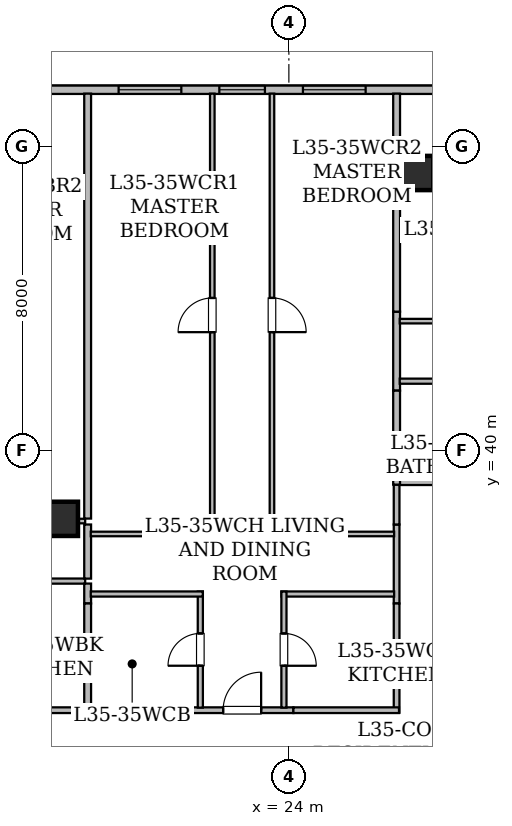
"""IFC4 building model, lengths in metres.
Left out: names, types, materials, properties, quantities, classifications, styles, units other than length and angle.
Written with IfcOpenShell. Run it as: python <this file> out.ifc"""

import sys

from ifc_helpers import new_model, si_unit, direction, frame, frame_2d, origin, origin_2d, place, context, subcontext, project, spatial, rectangle, hollow_rectangle, extrude, element, fill, save


model = new_model("IFC4")
c1 = context("Model", 3, precision=1e-05, world=origin(), true_north=direction((0.0, 1.0)))
c2 = subcontext(c1, "Body", "Model", "MODEL_VIEW")
j1 = project(units=[si_unit("LENGTHUNIT", "METRE"), si_unit("PLANEANGLEUNIT", "RADIAN")], contexts=[c1])
p1 = place(None, origin())
s1 = spatial("IfcSite", under=j1, at=p1, CompositionType="ELEMENT")
p2 = place(p1, origin())
s2 = spatial("IfcBuilding", under=s1, at=p2, CompositionType="ELEMENT")
p3 = place(p2, frame((0.0, 0.0, 138.4)))
s3 = spatial("IfcBuildingStorey", under=s2, at=p3, CompositionType="ELEMENT", Elevation=138.4)
for number, where, z_axis, x_axis in (
    (1, (27.35, 47.3, 0.0), (0.0, 0.0, 1.0), (1.0, 0.0, 0.0)),
    (2, (18.0, 38.2, 0.0), (0.0, 0.0, 1.0), (1.0, 0.0, 0.0)),
):
    element("IfcColumn", number, at=place(p3, frame(where, z_axis=z_axis, x_axis=x_axis)), inside=s3, PredefinedType="COLUMN", context=c2, shape_type="SweptSolid", body=[
        extrude(hollow_rectangle(XDim=0.9, YDim=0.9, WallThickness=0.045, at=origin_2d()), origin(), (0.0, 0.0, 1.0), 3.65),
    ])
p4 = place(p3, frame((13.715, 49.49, 0.0), z_axis=(0.0, 0.0, 1.0), x_axis=(1.0, 0.0, 0.0)))
e3 = element("IfcWall", 3, at=p4, inside=s3, PredefinedType="STANDARD", context=c2, shape_type="SweptSolid", body=[
    extrude(rectangle(XDim=38.639, YDim=0.22, at=frame_2d((19.319, 0.0))), origin(), (0.0, 0.0, 1.0), 3.43),
])
p5 = place(p4, frame((2.243, 0.0, 0.85)))
e4 = element("IfcOpeningElement", 4, at=p5, cuts=e3, PredefinedType="OPENING", context=c2, shape_type="SweptSolid", body=[
    extrude(rectangle(XDim=1.65, YDim=1.55, at=frame_2d((0.825, 0.775))), frame((0.0, 0.12, 0.0), z_axis=(0.0, -1.0, 0.0), x_axis=(1.0, 0.0, 0.0)), (0.0, 0.0, 1.0), 0.24),
])
p6 = place(p4, frame((8.455, 0.0, 0.8)))
e5 = element("IfcOpeningElement", 5, at=p6, cuts=e3, PredefinedType="OPENING", context=c2, shape_type="SweptSolid", body=[
    extrude(rectangle(XDim=1.2, YDim=1.5, at=frame_2d((0.6, 0.75))), frame((0.0, 0.12, 0.0), z_axis=(0.0, -1.0, 0.0), x_axis=(1.0, 0.0, 0.0)), (0.0, 0.0, 1.0), 0.24),
])
p7 = place(p4, frame((5.805, 0.0, 0.85)))
e6 = element("IfcOpeningElement", 6, at=p7, cuts=e3, PredefinedType="OPENING", context=c2, shape_type="SweptSolid", body=[
    extrude(rectangle(XDim=1.65, YDim=1.55, at=frame_2d((0.825, 0.775))), frame((0.0, 0.12, 0.0), z_axis=(0.0, -1.0, 0.0), x_axis=(1.0, 0.0, 0.0)), (0.0, 0.0, 1.0), 0.24),
])
p8 = place(p4, frame((10.655, 0.0, 0.85)))
e7 = element("IfcOpeningElement", 7, at=p8, cuts=e3, PredefinedType="OPENING", context=c2, shape_type="SweptSolid", body=[
    extrude(rectangle(XDim=1.65, YDim=1.55, at=frame_2d((0.825, 0.775))), frame((0.0, 0.12, 0.0), z_axis=(0.0, -1.0, 0.0), x_axis=(1.0, 0.0, 0.0)), (0.0, 0.0, 1.0), 0.24),
])
p9 = place(p4, frame((16.851, 0.0, 0.85)))
e8 = element("IfcOpeningElement", 8, at=p9, cuts=e3, PredefinedType="OPENING", context=c2, shape_type="SweptSolid", body=[
    extrude(rectangle(XDim=1.65, YDim=1.55, at=frame_2d((0.825, 0.775))), frame((0.0, 0.12, 0.0), z_axis=(0.0, -1.0, 0.0), x_axis=(1.0, 0.0, 0.0)), (0.0, 0.0, 1.0), 0.24),
])
p10 = place(p4, frame((24.116, 0.0, 0.85)))
e9 = element("IfcOpeningElement", 9, at=p10, cuts=e3, PredefinedType="OPENING", context=c2, shape_type="SweptSolid", body=[
    extrude(rectangle(XDim=1.65, YDim=1.55, at=frame_2d((0.825, 0.775))), frame((0.0, 0.12, 0.0), z_axis=(0.0, -1.0, 0.0), x_axis=(1.0, 0.0, 0.0)), (0.0, 0.0, 1.0), 0.24),
])
p11 = place(p4, frame((30.23, 0.0, 0.85)))
e10 = element("IfcOpeningElement", 10, at=p11, cuts=e3, PredefinedType="OPENING", context=c2, shape_type="SweptSolid", body=[
    extrude(rectangle(XDim=1.65, YDim=1.55, at=frame_2d((0.825, 0.775))), frame((0.0, 0.12, 0.0), z_axis=(0.0, -1.0, 0.0), x_axis=(1.0, 0.0, 0.0)), (0.0, 0.0, 1.0), 0.24),
])
p12 = place(p4, frame((36.367, 0.0, 0.85)))
e11 = element("IfcOpeningElement", 11, at=p12, cuts=e3, PredefinedType="OPENING", context=c2, shape_type="SweptSolid", body=[
    extrude(rectangle(XDim=1.65, YDim=1.55, at=frame_2d((0.825, 0.775))), frame((0.0, 0.12, 0.0), z_axis=(0.0, -1.0, 0.0), x_axis=(1.0, 0.0, 0.0)), (0.0, 0.0, 1.0), 0.24),
])
p13 = place(p3, frame((15.424, 33.165, 0.0), z_axis=(0.0, 0.0, 1.0), x_axis=(1.0, 0.0, 0.0)))
e12 = element("IfcWall", 12, at=p13, inside=s3, PredefinedType="STANDARD", context=c2, shape_type="SweptSolid", body=[
    extrude(rectangle(XDim=3.53, YDim=0.15, at=frame_2d((1.765, 0.0))), origin(), (0.0, 0.0, 1.0), 2.647),
])
p14 = place(p3, frame((26.835, 35.973, 0.0), z_axis=(0.0, 0.0, 1.0), x_axis=(0.0, 1.0, 0.0)))
e13 = element("IfcWall", 13, at=p14, inside=s3, PredefinedType="STANDARD", context=c2, shape_type="SweptSolid", body=[
    extrude(rectangle(XDim=2.078, YDim=0.15, at=frame_2d((1.039, 0.0))), origin(), (0.0, 0.0, 1.0), 2.647),
])
p15 = place(p3, frame((21.421, 33.165, 0.0), z_axis=(0.0, 0.0, 1.0), x_axis=(1.0, 0.0, 0.0)))
e14 = element("IfcWall", 14, at=p15, inside=s3, PredefinedType="STANDARD", context=c2, shape_type="SweptSolid", body=[
    extrude(rectangle(XDim=2.698, YDim=0.15, at=frame_2d((1.349, 0.0))), origin(), (0.0, 0.0, 1.0), 3.43),
])
p16 = place(p15, frame((0.849, 0.0, 0.0)))
e15 = element("IfcOpeningElement", 15, at=p16, cuts=e14, PredefinedType="OPENING", context=c2, shape_type="SweptSolid", body=[
    extrude(rectangle(XDim=1.0, YDim=2.15, at=frame_2d((0.5, 1.075))), frame((0.0, 0.085, 0.0), z_axis=(0.0, -1.0, 0.0), x_axis=(1.0, 0.0, 0.0)), (0.0, 0.0, 1.0), 0.17),
])
p17 = place(p3, frame((18.954, 33.165, 0.0), z_axis=(0.0, 0.0, 1.0), x_axis=(1.0, 0.0, 0.0)))
e16 = element("IfcWall", 16, at=p17, inside=s3, PredefinedType="STANDARD", context=c2, shape_type="SweptSolid", body=[
    extrude(rectangle(XDim=2.467, YDim=0.15, at=frame_2d((1.233, 0.0))), origin(), (0.0, 0.0, 1.0), 3.43),
])
p18 = place(p3, frame((26.835, 33.1, 0.0), z_axis=(0.0, 0.0, 1.0), x_axis=(0.0, 1.0, 0.0)))
e17 = element("IfcWall", 17, at=p18, inside=s3, PredefinedType="STANDARD", context=c2, shape_type="SweptSolid", body=[
    extrude(rectangle(XDim=2.873, YDim=0.15, at=frame_2d((1.437, 0.0))), origin(), (0.0, 0.0, 1.0), 3.43),
])
p19 = place(p3, frame((24.119, 33.165, 0.0), z_axis=(0.0, 0.0, 1.0), x_axis=(1.0, 0.0, 0.0)))
e18 = element("IfcWall", 18, at=p19, inside=s3, PredefinedType="STANDARD", context=c2, shape_type="SweptSolid", body=[
    extrude(rectangle(XDim=2.779, YDim=0.15, at=frame_2d((1.39, 0.0))), origin(), (0.0, 0.0, 1.0), 3.43),
])
p20 = place(p3, frame((26.835, 38.051, 0.0), z_axis=(0.0, 0.0, 1.0), x_axis=(0.0, 1.0, 0.0)))
e19 = element("IfcWall", 19, at=p20, inside=s3, PredefinedType="STANDARD", context=c2, shape_type="SweptSolid", body=[
    extrude(rectangle(XDim=1.049, YDim=0.15, at=frame_2d((0.524, 0.0))), origin(), (0.0, 0.0, 1.0), 3.43),
])
p21 = place(p3, frame((26.9, 39.165, 0.0), z_axis=(0.0, 0.0, 1.0), x_axis=(1.0, 0.0, 0.0)))
e20 = element("IfcWall", 20, at=p21, inside=s3, PredefinedType="STANDARD", context=c2, shape_type="SweptSolid", body=[
    extrude(rectangle(XDim=4.701, YDim=0.15, at=frame_2d((2.351, 0.0))), origin(), (0.0, 0.0, 1.0), 2.647),
])
p22 = place(p3, frame((18.64, 36.562, 0.0), z_axis=(0.0, 0.0, 1.0), x_axis=(-1.0, 0.0, 0.0)))
e21 = element("IfcWall", 21, at=p22, inside=s3, PredefinedType="PARTITIONING", context=c2, shape_type="SweptSolid", body=[
    extrude(rectangle(XDim=3.53, YDim=0.135, at=frame_2d((1.765, 0.0))), origin(), (0.0, 0.0, 1.0), 2.647),
])
p23 = place(p22, frame((1.34, 0.0, 0.0)))
e22 = element("IfcOpeningElement", 22, at=p23, cuts=e21, PredefinedType="OPENING", context=c2, shape_type="SweptSolid", body=[
    extrude(rectangle(XDim=0.85, YDim=2.1, at=frame_2d((0.425, 1.05))), frame((0.0, 0.077, 0.0), z_axis=(0.0, -1.0, 0.0), x_axis=(1.0, 0.0, 0.0)), (0.0, 0.0, 1.0), 0.155),
])
p24 = place(p3, frame((14.795, 38.142, 0.0), z_axis=(0.0, 0.0, 1.0), x_axis=(1.0, 0.0, 0.0)))
e23 = element("IfcWall", 23, at=p24, inside=s3, PredefinedType="PARTITIONING", context=c2, shape_type="SweptSolid", body=[
    extrude(rectangle(XDim=3.845, YDim=0.12, at=frame_2d((1.922, 0.0))), origin(), (0.0, 0.0, 1.0), 2.647),
])
p25 = place(p3, frame((18.705, 38.051, 0.0), z_axis=(0.0, 0.0, 1.0), x_axis=(0.0, -1.0, 0.0)))
e24 = element("IfcWall", 24, at=p25, inside=s3, PredefinedType="STANDARD", context=c2, shape_type="SweptSolid", body=[
    extrude(rectangle(XDim=1.424, YDim=0.18, at=frame_2d((0.712, 0.0))), origin(), (0.0, 0.0, 1.0), 2.647),
])
p26 = place(p3, frame((18.705, 36.497, 0.0), z_axis=(0.0, 0.0, 1.0), x_axis=(0.0, -1.0, 0.0)))
e25 = element("IfcWall", 25, at=p26, inside=s3, PredefinedType="STANDARD", context=c2, shape_type="SweptSolid", body=[
    extrude(rectangle(XDim=0.524, YDim=0.18, at=frame_2d((0.262, 0.0))), origin(), (0.0, 0.0, 1.0), 3.43),
])
p27 = place(p3, frame((18.705, 35.973, 0.0), z_axis=(0.0, 0.0, 1.0), x_axis=(0.0, -1.0, 0.0)))
e26 = element("IfcWall", 26, at=p27, inside=s3, PredefinedType="STANDARD", context=c2, shape_type="SweptSolid", body=[
    extrude(rectangle(XDim=2.741, YDim=0.18, at=frame_2d((1.371, 0.0))), origin(), (0.0, 0.0, 1.0), 3.43),
])
p28 = place(p3, frame((18.705, 49.388, 0.0), z_axis=(0.0, 0.0, 1.0), x_axis=(0.0, -1.0, 0.0)))
e27 = element("IfcWall", 27, at=p28, inside=s3, PredefinedType="STANDARD", context=c2, shape_type="SweptSolid", body=[
    extrude(rectangle(XDim=11.181, YDim=0.18, at=frame_2d((5.59, 0.0))), origin(), (0.0, 0.0, 1.0), 2.647),
])
p29 = place(p3, frame((21.67, 33.232, 0.0), z_axis=(0.0, 0.0, 1.0), x_axis=(0.0, 1.0, 0.0)))
e28 = element("IfcWall", 28, at=p29, inside=s3, PredefinedType="PARTITIONING", context=c2, shape_type="SweptSolid", body=[
    extrude(rectangle(XDim=3.055, YDim=0.135, at=frame_2d((1.528, 0.0))), origin(), (0.0, 0.0, 1.0), 3.43),
])
p30 = place(p29, frame((1.103, 0.0, 0.0)))
e29 = element("IfcOpeningElement", 29, at=p30, cuts=e28, PredefinedType="OPENING", context=c2, shape_type="SweptSolid", body=[
    extrude(rectangle(XDim=0.85, YDim=2.1, at=frame_2d((0.425, 1.05))), frame((0.0, 0.077, 0.0), z_axis=(0.0, -1.0, 0.0), x_axis=(1.0, 0.0, 0.0)), (0.0, 0.0, 1.0), 0.155),
])
p31 = place(p3, frame((21.735, 36.222, 0.0), z_axis=(0.0, 0.0, 1.0), x_axis=(-1.0, 0.0, 0.0)))
e30 = element("IfcWall", 30, at=p31, inside=s3, PredefinedType="PARTITIONING", context=c2, shape_type="SweptSolid", body=[
    extrude(rectangle(XDim=2.948, YDim=0.135, at=frame_2d((1.474, 0.0))), origin(), (0.0, 0.0, 1.0), 3.43),
])
p32 = place(p3, frame((26.77, 36.222, 0.0), z_axis=(0.0, 0.0, 1.0), x_axis=(-1.0, 0.0, 0.0)))
e31 = element("IfcWall", 31, at=p32, inside=s3, PredefinedType="PARTITIONING", context=c2, shape_type="SweptSolid", body=[
    extrude(rectangle(XDim=2.965, YDim=0.135, at=frame_2d((1.482, 0.0))), origin(), (0.0, 0.0, 1.0), 3.43),
])
p33 = place(p3, frame((23.87, 36.287, 0.0), z_axis=(0.0, 0.0, 1.0), x_axis=(0.0, -1.0, 0.0)))
e32 = element("IfcWall", 32, at=p33, inside=s3, PredefinedType="PARTITIONING", context=c2, shape_type="SweptSolid", body=[
    extrude(rectangle(XDim=3.055, YDim=0.135, at=frame_2d((1.528, 0.0))), origin(), (0.0, 0.0, 1.0), 3.43),
])
p34 = place(p33, frame((1.103, 0.0, 0.0)))
e33 = element("IfcOpeningElement", 33, at=p34, cuts=e32, PredefinedType="OPENING", context=c2, shape_type="SweptSolid", body=[
    extrude(rectangle(XDim=0.85, YDim=2.1, at=frame_2d((0.425, 1.05))), frame((0.0, 0.077, 0.0), z_axis=(0.0, -1.0, 0.0), x_axis=(1.0, 0.0, 0.0)), (0.0, 0.0, 1.0), 0.155),
])
p35 = place(p3, frame((18.787, 37.802, 0.0), z_axis=(0.0, 0.0, 1.0), x_axis=(1.0, 0.0, 0.0)))
e34 = element("IfcWall", 34, at=p35, inside=s3, PredefinedType="PARTITIONING", context=c2, shape_type="SweptSolid", body=[
    extrude(rectangle(XDim=3.263, YDim=0.12, at=frame_2d((1.631, 0.0))), origin(), (0.0, 0.0, 1.0), 2.647),
])
p36 = place(p3, frame((21.985, 37.737, 0.0), z_axis=(0.0, 0.0, 1.0), x_axis=(0.0, 1.0, 0.0)))
e35 = element("IfcWall", 35, at=p36, inside=s3, PredefinedType="PARTITIONING", context=c2, shape_type="SweptSolid", body=[
    extrude(rectangle(XDim=11.651, YDim=0.12, at=frame_2d((5.825, 0.0))), origin(), (0.0, 0.0, 1.0), 2.647),
])
p37 = place(p36, frame((5.375, 0.0, 0.0)))
e36 = element("IfcOpeningElement", 36, at=p37, cuts=e35, PredefinedType="OPENING", context=c2, shape_type="SweptSolid", body=[
    extrude(rectangle(XDim=0.9, YDim=2.1, at=frame_2d((0.45, 1.05))), frame((0.0, 0.07, 0.0), z_axis=(0.0, -1.0, 0.0), x_axis=(1.0, 0.0, 0.0)), (0.0, 0.0, 1.0), 0.14),
])
p38 = place(p3, frame((23.555, 49.388, 0.0), z_axis=(0.0, 0.0, 1.0), x_axis=(0.0, -1.0, 0.0)))
e37 = element("IfcWall", 37, at=p38, inside=s3, PredefinedType="PARTITIONING", context=c2, shape_type="SweptSolid", body=[
    extrude(rectangle(XDim=11.651, YDim=0.12, at=frame_2d((5.825, 0.0))), origin(), (0.0, 0.0, 1.0), 2.647),
])
p39 = place(p38, frame((5.375, 0.0, 0.0)))
e38 = element("IfcOpeningElement", 38, at=p39, cuts=e37, PredefinedType="OPENING", context=c2, shape_type="SweptSolid", body=[
    extrude(rectangle(XDim=0.9, YDim=2.1, at=frame_2d((0.45, 1.05))), frame((0.0, 0.07, 0.0), z_axis=(0.0, -1.0, 0.0), x_axis=(1.0, 0.0, 0.0)), (0.0, 0.0, 1.0), 0.14),
])
p40 = place(p3, frame((23.49, 37.802, 0.0), z_axis=(0.0, 0.0, 1.0), x_axis=(1.0, 0.0, 0.0)))
e39 = element("IfcWall", 39, at=p40, inside=s3, PredefinedType="PARTITIONING", context=c2, shape_type="SweptSolid", body=[
    extrude(rectangle(XDim=3.28, YDim=0.12, at=frame_2d((1.64, 0.0))), origin(), (0.0, 0.0, 1.0), 2.647),
])
p41 = place(p3, frame((26.835, 43.651, 0.0), z_axis=(0.0, 0.0, 1.0), x_axis=(0.0, -1.0, 0.0)))
e40 = element("IfcWall", 40, at=p41, inside=s3, PredefinedType="STANDARD", context=c2, shape_type="SweptSolid", body=[
    extrude(rectangle(XDim=2.078, YDim=0.18, at=frame_2d((1.039, 0.0))), origin(), (0.0, 0.0, 1.0), 3.43),
])
p42 = place(p3, frame((26.835, 41.573, 0.0), z_axis=(0.0, 0.0, 1.0), x_axis=(0.0, -1.0, 0.0)))
e41 = element("IfcWall", 41, at=p42, inside=s3, PredefinedType="STANDARD", context=c2, shape_type="SweptSolid", body=[
    extrude(rectangle(XDim=2.473, YDim=0.18, at=frame_2d((1.236, 0.0))), origin(), (0.0, 0.0, 1.0), 3.43),
])
p43 = place(p3, frame((26.835, 49.388, 0.0), z_axis=(0.0, 0.0, 1.0), x_axis=(0.0, -1.0, 0.0)))
e42 = element("IfcWall", 42, at=p43, inside=s3, PredefinedType="STANDARD", context=c2, shape_type="SweptSolid", body=[
    extrude(rectangle(XDim=5.737, YDim=0.18, at=frame_2d((2.869, 0.0))), origin(), (0.0, 0.0, 1.0), 2.876),
])
p44 = place(p3, frame((31.915, 41.822, 0.0), z_axis=(0.0, 0.0, 1.0), x_axis=(-1.0, 0.0, 0.0)))
e43 = element("IfcWall", 43, at=p44, inside=s3, PredefinedType="PARTITIONING", context=c2, shape_type="SweptSolid", body=[
    extrude(rectangle(XDim=4.998, YDim=0.135, at=frame_2d((2.499, 0.0))), origin(), (0.0, 0.0, 1.0), 2.647),
])
p45 = place(p44, frame((2.074, 0.0, 0.0)))
e44 = element("IfcOpeningElement", 44, at=p45, cuts=e43, PredefinedType="OPENING", context=c2, shape_type="SweptSolid", body=[
    extrude(rectangle(XDim=0.85, YDim=2.1, at=frame_2d((0.425, 1.05))), frame((0.0, 0.077, 0.0), z_axis=(0.0, -1.0, 0.0), x_axis=(1.0, 0.0, 0.0)), (0.0, 0.0, 1.0), 0.155),
])
p46 = place(p3, frame((26.917, 43.402, 0.0), z_axis=(0.0, 0.0, 1.0), x_axis=(1.0, 0.0, 0.0)))
e45 = element("IfcWall", 45, at=p46, inside=s3, PredefinedType="PARTITIONING", context=c2, shape_type="SweptSolid", body=[
    extrude(rectangle(XDim=9.279, YDim=0.12, at=frame_2d((4.64, 0.0))), origin(), (0.0, 0.0, 1.0), 2.647),
])
p47 = place(p46, frame((4.168, 0.0, 0.0)))
e46 = element("IfcOpeningElement", 46, at=p47, cuts=e45, PredefinedType="OPENING", context=c2, shape_type="SweptSolid", body=[
    extrude(rectangle(XDim=0.9, YDim=2.1, at=frame_2d((0.45, 1.05))), frame((0.0, 0.07, 0.0), z_axis=(0.0, -1.0, 0.0), x_axis=(1.0, 0.0, 0.0)), (0.0, 0.0, 1.0), 0.14),
])
p48 = place(p6, origin())
e47 = element("IfcWindow", 47, at=p48, inside=s3, PartitioningType="SINGLE_PANEL", PredefinedType="WINDOW", context=c2, shape_type="SweptSolid", body=[
    extrude(rectangle(XDim=1.2, YDim=1.5, at=frame_2d((0.6, 0.75))), frame((0.0, 0.03, 0.0), z_axis=(0.0, -1.0, 0.0), x_axis=(1.0, 0.0, 0.0)), (0.0, 0.0, 1.0), 0.06),
])
fill(e5, e47)
p49 = place(p7, origin())
e48 = element("IfcWindow", 48, at=p49, inside=s3, PartitioningType="SINGLE_PANEL", PredefinedType="WINDOW", context=c2, shape_type="SweptSolid", body=[
    extrude(rectangle(XDim=1.65, YDim=1.55, at=frame_2d((0.825, 0.775))), frame((0.0, 0.03, 0.0), z_axis=(0.0, -1.0, 0.0), x_axis=(1.0, 0.0, 0.0)), (0.0, 0.0, 1.0), 0.06),
])
fill(e6, e48)
p50 = place(p8, origin())
e49 = element("IfcWindow", 49, at=p50, inside=s3, PartitioningType="SINGLE_PANEL", PredefinedType="WINDOW", context=c2, shape_type="SweptSolid", body=[
    extrude(rectangle(XDim=1.65, YDim=1.55, at=frame_2d((0.825, 0.775))), frame((0.0, 0.03, 0.0), z_axis=(0.0, -1.0, 0.0), x_axis=(1.0, 0.0, 0.0)), (0.0, 0.0, 1.0), 0.06),
])
fill(e7, e49)
p51 = place(p16, origin())
e50 = element("IfcDoor", 50, at=p51, inside=s3, OperationType="SINGLE_SWING_RIGHT", PredefinedType="DOOR", context=c2, shape_type="SweptSolid", body=[
    extrude(rectangle(XDim=1.0, YDim=2.15, at=frame_2d((0.5, 1.075))), frame((0.0, 0.025, 0.0), z_axis=(0.0, -1.0, 0.0), x_axis=(1.0, 0.0, 0.0)), (0.0, 0.0, 1.0), 0.05),
])
fill(e15, e50)
p52 = place(p30, origin())
e51 = element("IfcDoor", 51, at=p52, inside=s3, OperationType="SINGLE_SWING_LEFT", PredefinedType="DOOR", context=c2, shape_type="SweptSolid", body=[
    extrude(rectangle(XDim=0.85, YDim=2.1, at=frame_2d((0.425, 1.05))), frame((0.0, 0.025, 0.0), z_axis=(0.0, -1.0, 0.0), x_axis=(1.0, 0.0, 0.0)), (0.0, 0.0, 1.0), 0.05),
])
fill(e29, e51)
p53 = place(p34, origin())
e52 = element("IfcDoor", 52, at=p53, inside=s3, OperationType="SINGLE_SWING_RIGHT", PredefinedType="DOOR", context=c2, shape_type="SweptSolid", body=[
    extrude(rectangle(XDim=0.85, YDim=2.1, at=frame_2d((0.425, 1.05))), frame((0.0, 0.025, 0.0), z_axis=(0.0, -1.0, 0.0), x_axis=(1.0, 0.0, 0.0)), (0.0, 0.0, 1.0), 0.05),
])
fill(e33, e52)
p54 = place(p37, origin())
e53 = element("IfcDoor", 53, at=p54, inside=s3, OperationType="SINGLE_SWING_LEFT", PredefinedType="DOOR", context=c2, shape_type="SweptSolid", body=[
    extrude(rectangle(XDim=0.9, YDim=2.1, at=frame_2d((0.45, 1.05))), frame((0.0, 0.025, 0.0), z_axis=(0.0, -1.0, 0.0), x_axis=(1.0, 0.0, 0.0)), (0.0, 0.0, 1.0), 0.05),
])
fill(e36, e53)
p55 = place(p39, origin())
e54 = element("IfcDoor", 54, at=p55, inside=s3, OperationType="SINGLE_SWING_RIGHT", PredefinedType="DOOR", context=c2, shape_type="SweptSolid", body=[
    extrude(rectangle(XDim=0.9, YDim=2.1, at=frame_2d((0.45, 1.05))), frame((0.0, 0.025, 0.0), z_axis=(0.0, -1.0, 0.0), x_axis=(1.0, 0.0, 0.0)), (0.0, 0.0, 1.0), 0.05),
])
fill(e38, e54)
save(model, sys.argv[1])
